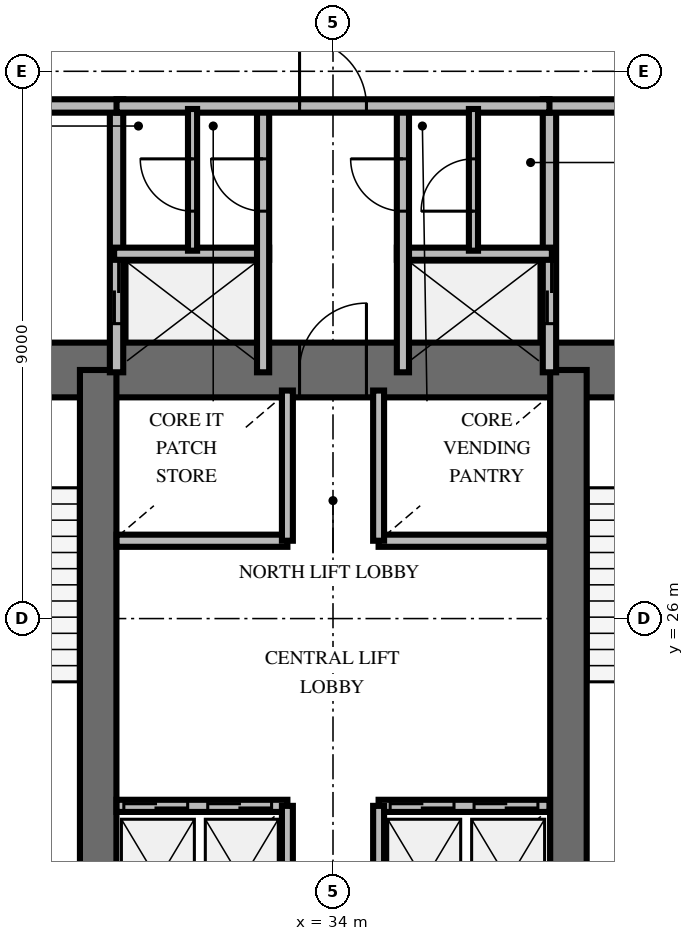
"""IFC4 building model, lengths in metres.
Left out: names, types, materials, properties, quantities, classifications, styles, units other than length and angle.
Written with IfcOpenShell. Run it as: python <this file> out.ifc"""

import sys

from ifc_helpers import new_model, si_unit, direction, frame, frame_2d, origin, place, context, subcontext, project, spatial, rectangle, extrude, element, fill, save


model = new_model("IFC4")
c1 = context("Model", 3, precision=1e-05, world=origin(), true_north=direction((0.0, 1.0)))
c2 = subcontext(c1, "Body", "Model", "MODEL_VIEW")
j1 = project(units=[si_unit("LENGTHUNIT", "METRE"), si_unit("PLANEANGLEUNIT", "RADIAN")], contexts=[c1])
p1 = place(None, origin())
s1 = spatial("IfcSite", under=j1, at=p1, CompositionType="ELEMENT")
p2 = place(p1, origin())
s2 = spatial("IfcBuilding", under=s1, at=p2, CompositionType="ELEMENT")
p3 = place(p2, frame((0.0, 0.0, 42.6)))
s3 = spatial("IfcBuildingStorey", under=s2, at=p3, CompositionType="ELEMENT", Elevation=42.6)
p4 = place(p3, frame((25.922, 30.088, 0.0), z_axis=(0.0, 0.0, 1.0), x_axis=(1.0, 0.0, 0.0)))
e1 = element("IfcWall", 1, at=p4, inside=s3, PredefinedType="SHEAR", context=c2, shape_type="SweptSolid", body=[
    extrude(rectangle(XDim=16.166, YDim=0.9, at=frame_2d((8.083, 0.0))), origin(), (0.0, 0.0, 1.0), 4.2),
])
p5 = place(p4, frame((1.028, 0.0, 0.0)))
e2 = element("IfcOpeningElement", 2, at=p5, cuts=e1, PredefinedType="OPENING", context=c2, shape_type="SweptSolid", body=[
    extrude(rectangle(XDim=1.05, YDim=2.15, at=frame_2d((0.525, 1.075))), frame((0.0, 0.46, 0.0), z_axis=(0.0, -1.0, 0.0), x_axis=(1.0, 0.0, 0.0)), (0.0, 0.0, 1.0), 0.92),
])
p6 = place(p4, frame((14.078, 0.0, 0.0)))
e3 = element("IfcOpeningElement", 3, at=p6, cuts=e1, PredefinedType="OPENING", context=c2, shape_type="SweptSolid", body=[
    extrude(rectangle(XDim=1.05, YDim=2.15, at=frame_2d((0.525, 1.075))), frame((0.0, 0.46, 0.0), z_axis=(0.0, -1.0, 0.0), x_axis=(1.0, 0.0, 0.0)), (0.0, 0.0, 1.0), 0.92),
])
p7 = place(p4, frame((7.528, 0.0, 0.0)))
e4 = element("IfcOpeningElement", 4, at=p7, cuts=e1, PredefinedType="OPENING", context=c2, shape_type="SweptSolid", body=[
    extrude(rectangle(XDim=1.1, YDim=2.15, at=frame_2d((0.55, 1.075))), frame((0.0, 0.46, 0.0), z_axis=(0.0, -1.0, 0.0), x_axis=(1.0, 0.0, 0.0)), (0.0, 0.0, 1.0), 0.92),
])
for number, where, z_axis, x_axis in (
    (5, (30.138, 20.112, 0.0), (0.0, 0.0, 1.0), (0.0, 1.0, 0.0)),
    (6, (37.872, 20.112, 0.0), (0.0, 0.0, 1.0), (0.0, 1.0, 0.0)),
):
    element("IfcWall", number, at=place(p3, frame(where, z_axis=z_axis, x_axis=x_axis)), inside=s3, PredefinedType="SHEAR", context=c2, shape_type="SweptSolid", body=[
        extrude(rectangle(XDim=9.976, YDim=0.6, at=frame_2d((4.988, 0.0))), origin(), (0.0, 0.0, 1.0), 4.2),
    ])
p8 = place(p3, frame((30.44, 30.05, 0.0), z_axis=(0.0, 0.0, 1.0), x_axis=(0.0, 1.0, 0.0)))
e7 = element("IfcWall", 7, at=p8, inside=s3, PredefinedType="SOLIDWALL", context=c2, shape_type="SweptSolid", body=[
    extrude(rectangle(XDim=4.38, YDim=0.22, at=frame_2d((2.19, 0.0))), origin(), (0.0, 0.0, 1.0), 3.0),
])
p9 = place(p8, frame((0.8, 0.0, 0.0)))
e8 = element("IfcOpeningElement", 8, at=p9, cuts=e7, PredefinedType="OPENING", context=c2, shape_type="SweptSolid", body=[
    extrude(rectangle(XDim=1.05, YDim=2.1, at=frame_2d((0.525, 1.05))), frame((0.0, 0.12, 0.0), z_axis=(0.0, -1.0, 0.0), x_axis=(1.0, 0.0, 0.0)), (0.0, 0.0, 1.0), 0.24),
])
p10 = place(p3, frame((26.24, 34.43, 0.0), z_axis=(0.0, 0.0, 1.0), x_axis=(1.0, 0.0, 0.0)))
e9 = element("IfcWall", 9, at=p10, inside=s3, PredefinedType="SOLIDWALL", context=c2, shape_type="SweptSolid", body=[
    extrude(rectangle(XDim=4.31, YDim=0.22, at=frame_2d((2.155, 0.0))), origin(), (0.0, 0.0, 1.0), 3.0),
])
p11 = place(p10, frame((1.6, 0.0, 0.0)))
e10 = element("IfcOpeningElement", 10, at=p11, cuts=e9, PredefinedType="OPENING", context=c2, shape_type="SweptSolid", body=[
    extrude(rectangle(XDim=1.1, YDim=2.15, at=frame_2d((0.55, 1.075))), frame((0.0, 0.12, 0.0), z_axis=(0.0, -1.0, 0.0), x_axis=(1.0, 0.0, 0.0)), (0.0, 0.0, 1.0), 0.24),
])
p12 = place(p3, frame((30.4, 32.0, 0.0), z_axis=(0.0, 0.0, 1.0), x_axis=(1.0, 0.0, 0.0)))
e11 = element("IfcWall", 11, at=p12, inside=s3, PredefinedType="SOLIDWALL", context=c2, shape_type="SweptSolid", body=[
    extrude(rectangle(XDim=2.55, YDim=0.2, at=frame_2d((1.275, 0.0))), origin(), (0.0, 0.0, 1.0), 3.0),
])
p13 = place(p3, frame((32.85, 30.05, 0.0), z_axis=(0.0, 0.0, 1.0), x_axis=(0.0, 1.0, 0.0)))
e12 = element("IfcWall", 12, at=p13, inside=s3, PredefinedType="SOLIDWALL", context=c2, shape_type="SweptSolid", body=[
    extrude(rectangle(XDim=4.38, YDim=0.2, at=frame_2d((2.19, 0.0))), origin(), (0.0, 0.0, 1.0), 3.0),
])
p14 = place(p13, frame((2.65, 0.0, 0.0)))
e13 = element("IfcOpeningElement", 13, at=p14, cuts=e12, PredefinedType="OPENING", context=c2, shape_type="SweptSolid", body=[
    extrude(rectangle(XDim=0.86, YDim=2.05, at=frame_2d((0.43, 1.025))), frame((0.0, 0.11, 0.0), z_axis=(0.0, -1.0, 0.0), x_axis=(1.0, 0.0, 0.0)), (0.0, 0.0, 1.0), 0.22),
])
p15 = place(p3, frame((37.56, 30.05, 0.0), z_axis=(0.0, 0.0, 1.0), x_axis=(0.0, 1.0, 0.0)))
e14 = element("IfcWall", 14, at=p15, inside=s3, PredefinedType="SOLIDWALL", context=c2, shape_type="SweptSolid", body=[
    extrude(rectangle(XDim=4.38, YDim=0.22, at=frame_2d((2.19, 0.0))), origin(), (0.0, 0.0, 1.0), 3.0),
])
p16 = place(p15, frame((0.8, 0.0, 0.0)))
e15 = element("IfcOpeningElement", 15, at=p16, cuts=e14, PredefinedType="OPENING", context=c2, shape_type="SweptSolid", body=[
    extrude(rectangle(XDim=1.05, YDim=2.1, at=frame_2d((0.525, 1.05))), frame((0.0, 0.12, 0.0), z_axis=(0.0, -1.0, 0.0), x_axis=(1.0, 0.0, 0.0)), (0.0, 0.0, 1.0), 0.24),
])
p17 = place(p3, frame((37.45, 34.43, 0.0), z_axis=(0.0, 0.0, 1.0), x_axis=(1.0, 0.0, 0.0)))
e16 = element("IfcWall", 16, at=p17, inside=s3, PredefinedType="SOLIDWALL", context=c2, shape_type="SweptSolid", body=[
    extrude(rectangle(XDim=4.31, YDim=0.22, at=frame_2d((2.155, 0.0))), origin(), (0.0, 0.0, 1.0), 3.0),
])
p18 = place(p17, frame((1.6, 0.0, 0.0)))
e17 = element("IfcOpeningElement", 17, at=p18, cuts=e16, PredefinedType="OPENING", context=c2, shape_type="SweptSolid", body=[
    extrude(rectangle(XDim=1.1, YDim=2.15, at=frame_2d((0.55, 1.075))), frame((0.0, 0.12, 0.0), z_axis=(0.0, -1.0, 0.0), x_axis=(1.0, 0.0, 0.0)), (0.0, 0.0, 1.0), 0.24),
])
p19 = place(p3, frame((35.05, 32.0, 0.0), z_axis=(0.0, 0.0, 1.0), x_axis=(1.0, 0.0, 0.0)))
e18 = element("IfcWall", 18, at=p19, inside=s3, PredefinedType="SOLIDWALL", context=c2, shape_type="SweptSolid", body=[
    extrude(rectangle(XDim=2.55, YDim=0.2, at=frame_2d((1.275, 0.0))), origin(), (0.0, 0.0, 1.0), 3.0),
])
p20 = place(p3, frame((35.15, 30.05, 0.0), z_axis=(0.0, 0.0, 1.0), x_axis=(0.0, 1.0, 0.0)))
e19 = element("IfcWall", 19, at=p20, inside=s3, PredefinedType="SOLIDWALL", context=c2, shape_type="SweptSolid", body=[
    extrude(rectangle(XDim=4.38, YDim=0.2, at=frame_2d((2.19, 0.0))), origin(), (0.0, 0.0, 1.0), 3.0),
])
p21 = place(p20, frame((2.65, 0.0, 0.0)))
e20 = element("IfcOpeningElement", 20, at=p21, cuts=e19, PredefinedType="OPENING", context=c2, shape_type="SweptSolid", body=[
    extrude(rectangle(XDim=0.86, YDim=2.05, at=frame_2d((0.43, 1.025))), frame((0.0, 0.11, 0.0), z_axis=(0.0, -1.0, 0.0), x_axis=(1.0, 0.0, 0.0)), (0.0, 0.0, 1.0), 0.22),
])
p22 = place(p3, frame((30.44, 34.43, 0.0), z_axis=(0.0, 0.0, 1.0), x_axis=(1.0, 0.0, 0.0)))
e21 = element("IfcWall", 21, at=p22, inside=s3, PredefinedType="SOLIDWALL", context=c2, shape_type="SweptSolid", body=[
    extrude(rectangle(XDim=7.12, YDim=0.22, at=frame_2d((3.56, 0.0))), origin(), (0.0, 0.0, 1.0), 3.0),
])
p23 = place(p22, frame((3.01, 0.0, 0.0)))
e22 = element("IfcOpeningElement", 22, at=p23, cuts=e21, PredefinedType="OPENING", context=c2, shape_type="SweptSolid", body=[
    extrude(rectangle(XDim=1.1, YDim=2.15, at=frame_2d((0.55, 1.075))), frame((0.0, 0.12, 0.0), z_axis=(0.0, -1.0, 0.0), x_axis=(1.0, 0.0, 0.0)), (0.0, 0.0, 1.0), 0.24),
])
p24 = place(p3, frame((31.69, 32.05, 0.0), z_axis=(0.0, 0.0, 1.0), x_axis=(0.0, 1.0, 0.0)))
e23 = element("IfcWall", 23, at=p24, inside=s3, PredefinedType="PARTITIONING", context=c2, shape_type="SweptSolid", body=[
    extrude(rectangle(XDim=2.33, YDim=0.15, at=frame_2d((1.165, 0.0))), origin(), (0.0, 0.0, 1.0), 3.0),
])
p25 = place(p24, frame((0.65, 0.0, 0.0)))
e24 = element("IfcOpeningElement", 24, at=p25, cuts=e23, PredefinedType="OPENING", context=c2, shape_type="SweptSolid", body=[
    extrude(rectangle(XDim=0.86, YDim=2.05, at=frame_2d((0.43, 1.025))), frame((0.0, 0.085, 0.0), z_axis=(0.0, -1.0, 0.0), x_axis=(1.0, 0.0, 0.0)), (0.0, 0.0, 1.0), 0.17),
])
p26 = place(p3, frame((36.31, 32.05, 0.0), z_axis=(0.0, 0.0, 1.0), x_axis=(0.0, 1.0, 0.0)))
e25 = element("IfcWall", 25, at=p26, inside=s3, PredefinedType="PARTITIONING", context=c2, shape_type="SweptSolid", body=[
    extrude(rectangle(XDim=2.33, YDim=0.15, at=frame_2d((1.165, 0.0))), origin(), (0.0, 0.0, 1.0), 3.0),
])
p27 = place(p26, frame((0.65, 0.0, 0.0)))
e26 = element("IfcOpeningElement", 26, at=p27, cuts=e25, PredefinedType="OPENING", context=c2, shape_type="SweptSolid", body=[
    extrude(rectangle(XDim=0.86, YDim=2.05, at=frame_2d((0.43, 1.025))), frame((0.0, 0.085, 0.0), z_axis=(0.0, -1.0, 0.0), x_axis=(1.0, 0.0, 0.0)), (0.0, 0.0, 1.0), 0.17),
])
p28 = place(p3, frame((30.44, 22.92, 0.0), z_axis=(0.0, 0.0, 1.0), x_axis=(1.0, 0.0, 0.0)))
e27 = element("IfcWall", 27, at=p28, inside=s3, PredefinedType="SOLIDWALL", context=c2, shape_type="SweptSolid", body=[
    extrude(rectangle(XDim=2.81, YDim=0.2, at=frame_2d((1.405, 0.0))), origin(), (0.0, 0.0, 1.0), 3.0),
])
p29 = place(p28, frame((0.12, 0.0, 0.0)))
e28 = element("IfcOpeningElement", 28, at=p29, cuts=e27, PredefinedType="OPENING", context=c2, shape_type="SweptSolid", body=[
    extrude(rectangle(XDim=1.05, YDim=2.1, at=frame_2d((0.525, 1.05))), frame((0.0, 0.11, 0.0), z_axis=(0.0, -1.0, 0.0), x_axis=(1.0, 0.0, 0.0)), (0.0, 0.0, 1.0), 0.22),
])
p30 = place(p28, frame((1.5, 0.0, 0.0)))
e29 = element("IfcOpeningElement", 29, at=p30, cuts=e27, PredefinedType="OPENING", context=c2, shape_type="SweptSolid", body=[
    extrude(rectangle(XDim=1.05, YDim=2.1, at=frame_2d((0.525, 1.05))), frame((0.0, 0.11, 0.0), z_axis=(0.0, -1.0, 0.0), x_axis=(1.0, 0.0, 0.0)), (0.0, 0.0, 1.0), 0.22),
])
p31 = place(p3, frame((33.25, 20.5, 0.0), z_axis=(0.0, 0.0, 1.0), x_axis=(0.0, 1.0, 0.0)))
e30 = element("IfcWall", 30, at=p31, inside=s3, PredefinedType="SOLIDWALL", context=c2, shape_type="SweptSolid", body=[
    extrude(rectangle(XDim=2.42, YDim=0.18, at=frame_2d((1.21, 0.0))), origin(), (0.0, 0.0, 1.0), 3.0),
])
p32 = place(p3, frame((34.75, 22.92, 0.0), z_axis=(0.0, 0.0, 1.0), x_axis=(1.0, 0.0, 0.0)))
e31 = element("IfcWall", 31, at=p32, inside=s3, PredefinedType="SOLIDWALL", context=c2, shape_type="SweptSolid", body=[
    extrude(rectangle(XDim=2.81, YDim=0.2, at=frame_2d((1.405, 0.0))), origin(), (0.0, 0.0, 1.0), 3.0),
])
p33 = place(p32, frame((0.19, 0.0, 0.0)))
e32 = element("IfcOpeningElement", 32, at=p33, cuts=e31, PredefinedType="OPENING", context=c2, shape_type="SweptSolid", body=[
    extrude(rectangle(XDim=1.05, YDim=2.1, at=frame_2d((0.525, 1.05))), frame((0.0, 0.11, 0.0), z_axis=(0.0, -1.0, 0.0), x_axis=(1.0, 0.0, 0.0)), (0.0, 0.0, 1.0), 0.22),
])
p34 = place(p32, frame((1.57, 0.0, 0.0)))
e33 = element("IfcOpeningElement", 33, at=p34, cuts=e31, PredefinedType="OPENING", context=c2, shape_type="SweptSolid", body=[
    extrude(rectangle(XDim=1.05, YDim=2.1, at=frame_2d((0.525, 1.05))), frame((0.0, 0.11, 0.0), z_axis=(0.0, -1.0, 0.0), x_axis=(1.0, 0.0, 0.0)), (0.0, 0.0, 1.0), 0.22),
])
p35 = place(p3, frame((34.75, 20.5, 0.0), z_axis=(0.0, 0.0, 1.0), x_axis=(0.0, 1.0, 0.0)))
e34 = element("IfcWall", 34, at=p35, inside=s3, PredefinedType="SOLIDWALL", context=c2, shape_type="SweptSolid", body=[
    extrude(rectangle(XDim=2.42, YDim=0.18, at=frame_2d((1.21, 0.0))), origin(), (0.0, 0.0, 1.0), 3.0),
])
p36 = place(p3, frame((30.44, 27.28, 0.0), z_axis=(0.0, 0.0, 1.0), x_axis=(1.0, 0.0, 0.0)))
e35 = element("IfcWall", 35, at=p36, inside=s3, PredefinedType="SOLIDWALL", context=c2, shape_type="SweptSolid", body=[
    extrude(rectangle(XDim=2.81, YDim=0.2, at=frame_2d((1.405, 0.0))), origin(), (0.0, 0.0, 1.0), 3.0),
])
p37 = place(p3, frame((33.25, 27.28, 0.0), z_axis=(0.0, 0.0, 1.0), x_axis=(0.0, 1.0, 0.0)))
e36 = element("IfcWall", 36, at=p37, inside=s3, PredefinedType="SOLIDWALL", context=c2, shape_type="SweptSolid", body=[
    extrude(rectangle(XDim=2.47, YDim=0.18, at=frame_2d((1.235, 0.0))), origin(), (0.0, 0.0, 1.0), 3.0),
])
p38 = place(p3, frame((34.75, 27.28, 0.0), z_axis=(0.0, 0.0, 1.0), x_axis=(1.0, 0.0, 0.0)))
e37 = element("IfcWall", 37, at=p38, inside=s3, PredefinedType="SOLIDWALL", context=c2, shape_type="SweptSolid", body=[
    extrude(rectangle(XDim=2.81, YDim=0.2, at=frame_2d((1.405, 0.0))), origin(), (0.0, 0.0, 1.0), 3.0),
])
p39 = place(p3, frame((34.75, 27.28, 0.0), z_axis=(0.0, 0.0, 1.0), x_axis=(0.0, 1.0, 0.0)))
e38 = element("IfcWall", 38, at=p39, inside=s3, PredefinedType="SOLIDWALL", context=c2, shape_type="SweptSolid", body=[
    extrude(rectangle(XDim=2.47, YDim=0.18, at=frame_2d((1.235, 0.0))), origin(), (0.0, 0.0, 1.0), 3.0),
])
p40 = place(p7, origin())
e39 = element("IfcDoor", 39, at=p40, inside=s3, OperationType="SINGLE_SWING_RIGHT", PredefinedType="DOOR", context=c2, shape_type="SweptSolid", body=[
    extrude(rectangle(XDim=1.1, YDim=2.15, at=frame_2d((0.55, 1.075))), frame((0.0, 0.025, 0.0), z_axis=(0.0, -1.0, 0.0), x_axis=(1.0, 0.0, 0.0)), (0.0, 0.0, 1.0), 0.05),
])
fill(e4, e39)
p41 = place(p9, origin())
e40 = element("IfcDoor", 40, at=p41, inside=s3, OperationType="DOUBLE_DOOR_SLIDING", PredefinedType="USERDEFINED", context=c2, shape_type="SweptSolid", body=[
    extrude(rectangle(XDim=1.05, YDim=2.1, at=frame_2d((0.525, 1.05))), frame((0.0, 0.025, 0.0), z_axis=(0.0, -1.0, 0.0), x_axis=(1.0, 0.0, 0.0)), (0.0, 0.0, 1.0), 0.05),
])
fill(e8, e40)
p42 = place(p14, origin())
e41 = element("IfcDoor", 41, at=p42, inside=s3, OperationType="SINGLE_SWING_RIGHT", PredefinedType="TRAPDOOR", context=c2, shape_type="SweptSolid", body=[
    extrude(rectangle(XDim=0.86, YDim=2.05, at=frame_2d((0.43, 1.025))), frame((0.0, 0.025, 0.0), z_axis=(0.0, -1.0, 0.0), x_axis=(1.0, 0.0, 0.0)), (0.0, 0.0, 1.0), 0.05),
])
fill(e13, e41)
p43 = place(p16, origin())
e42 = element("IfcDoor", 42, at=p43, inside=s3, OperationType="DOUBLE_DOOR_SLIDING", PredefinedType="USERDEFINED", context=c2, shape_type="SweptSolid", body=[
    extrude(rectangle(XDim=1.05, YDim=2.1, at=frame_2d((0.525, 1.05))), frame((0.0, 0.025, 0.0), z_axis=(0.0, -1.0, 0.0), x_axis=(1.0, 0.0, 0.0)), (0.0, 0.0, 1.0), 0.05),
])
fill(e15, e42)
p44 = place(p21, origin())
e43 = element("IfcDoor", 43, at=p44, inside=s3, OperationType="SINGLE_SWING_RIGHT", PredefinedType="TRAPDOOR", context=c2, shape_type="SweptSolid", body=[
    extrude(rectangle(XDim=0.86, YDim=2.05, at=frame_2d((0.43, 1.025))), frame((0.0, 0.025, 0.0), z_axis=(0.0, -1.0, 0.0), x_axis=(1.0, 0.0, 0.0)), (0.0, 0.0, 1.0), 0.05),
])
fill(e20, e43)
p45 = place(p23, origin())
e44 = element("IfcDoor", 44, at=p45, inside=s3, OperationType="SINGLE_SWING_LEFT", PredefinedType="DOOR", context=c2, shape_type="SweptSolid", body=[
    extrude(rectangle(XDim=1.1, YDim=2.15, at=frame_2d((0.55, 1.075))), frame((0.0, 0.025, 0.0), z_axis=(0.0, -1.0, 0.0), x_axis=(1.0, 0.0, 0.0)), (0.0, 0.0, 1.0), 0.05),
])
fill(e22, e44)
p46 = place(p25, origin())
e45 = element("IfcDoor", 45, at=p46, inside=s3, OperationType="SINGLE_SWING_RIGHT", PredefinedType="TRAPDOOR", context=c2, shape_type="SweptSolid", body=[
    extrude(rectangle(XDim=0.86, YDim=2.05, at=frame_2d((0.43, 1.025))), frame((0.0, 0.025, 0.0), z_axis=(0.0, -1.0, 0.0), x_axis=(1.0, 0.0, 0.0)), (0.0, 0.0, 1.0), 0.05),
])
fill(e24, e45)
p47 = place(p27, origin())
e46 = element("IfcDoor", 46, at=p47, inside=s3, OperationType="SINGLE_SWING_LEFT", PredefinedType="TRAPDOOR", context=c2, shape_type="SweptSolid", body=[
    extrude(rectangle(XDim=0.86, YDim=2.05, at=frame_2d((0.43, 1.025))), frame((0.0, 0.025, 0.0), z_axis=(0.0, -1.0, 0.0), x_axis=(1.0, 0.0, 0.0)), (0.0, 0.0, 1.0), 0.05),
])
fill(e26, e46)
p48 = place(p29, origin())
e47 = element("IfcDoor", 47, at=p48, inside=s3, OperationType="DOUBLE_DOOR_SLIDING", PredefinedType="USERDEFINED", context=c2, shape_type="SweptSolid", body=[
    extrude(rectangle(XDim=1.05, YDim=2.1, at=frame_2d((0.525, 1.05))), frame((0.0, 0.025, 0.0), z_axis=(0.0, -1.0, 0.0), x_axis=(1.0, 0.0, 0.0)), (0.0, 0.0, 1.0), 0.05),
])
fill(e28, e47)
p49 = place(p30, origin())
e48 = element("IfcDoor", 48, at=p49, inside=s3, OperationType="DOUBLE_DOOR_SLIDING", PredefinedType="USERDEFINED", context=c2, shape_type="SweptSolid", body=[
    extrude(rectangle(XDim=1.05, YDim=2.1, at=frame_2d((0.525, 1.05))), frame((0.0, 0.025, 0.0), z_axis=(0.0, -1.0, 0.0), x_axis=(1.0, 0.0, 0.0)), (0.0, 0.0, 1.0), 0.05),
])
fill(e29, e48)
p50 = place(p33, origin())
e49 = element("IfcDoor", 49, at=p50, inside=s3, OperationType="DOUBLE_DOOR_SLIDING", PredefinedType="USERDEFINED", context=c2, shape_type="SweptSolid", body=[
    extrude(rectangle(XDim=1.05, YDim=2.1, at=frame_2d((0.525, 1.05))), frame((0.0, 0.025, 0.0), z_axis=(0.0, -1.0, 0.0), x_axis=(1.0, 0.0, 0.0)), (0.0, 0.0, 1.0), 0.05),
])
fill(e32, e49)
p51 = place(p34, origin())
e50 = element("IfcDoor", 50, at=p51, inside=s3, OperationType="DOUBLE_DOOR_SLIDING", PredefinedType="USERDEFINED", context=c2, shape_type="SweptSolid", body=[
    extrude(rectangle(XDim=1.05, YDim=2.1, at=frame_2d((0.525, 1.05))), frame((0.0, 0.025, 0.0), z_axis=(0.0, -1.0, 0.0), x_axis=(1.0, 0.0, 0.0)), (0.0, 0.0, 1.0), 0.05),
])
fill(e33, e50)
save(model, sys.argv[1])
